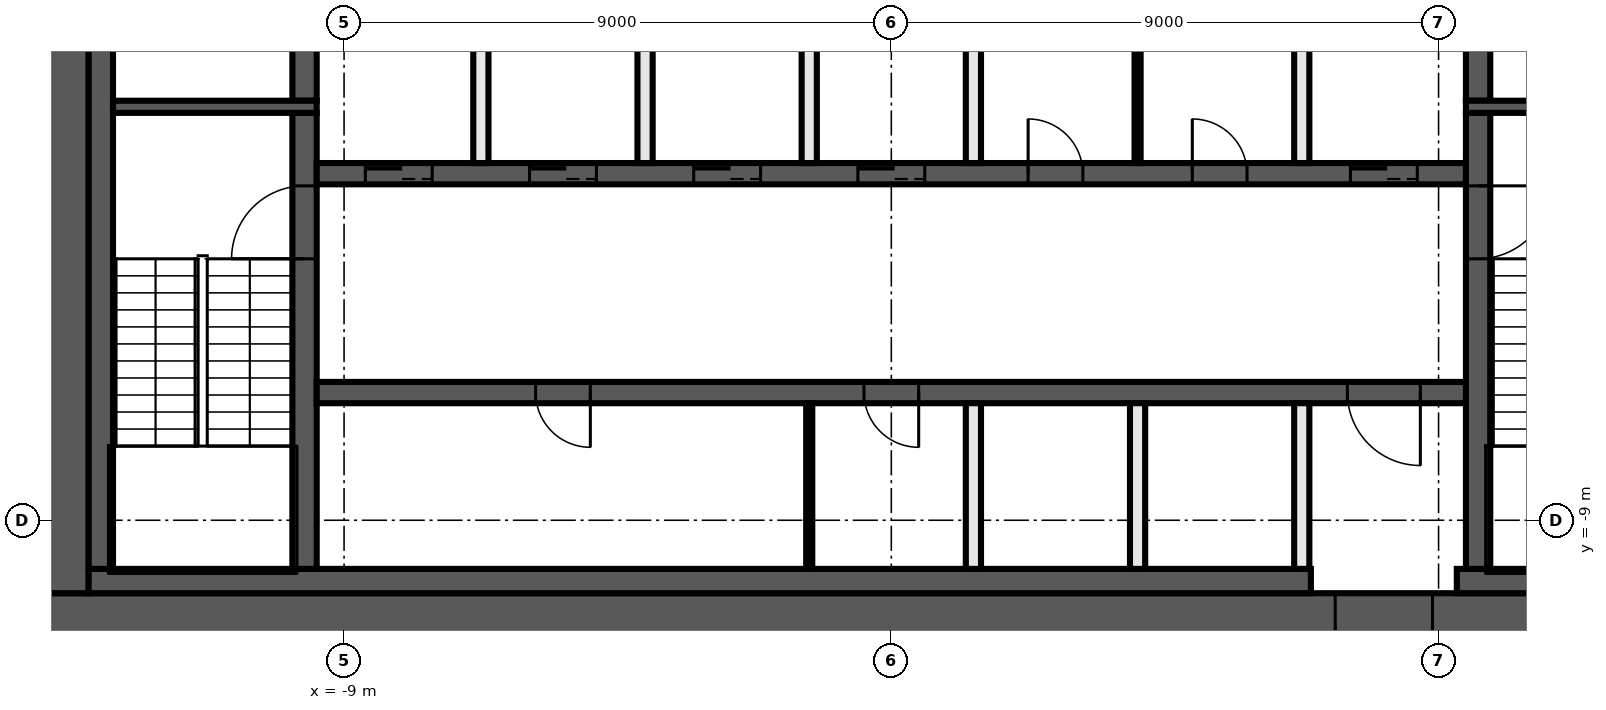
"""IFC4 building model, lengths in metres.
Left out: names, types, materials, properties, quantities, classifications, styles, units other than length and angle.
Written with IfcOpenShell. Run it as: python <this file> out.ifc"""

import sys

from ifc_helpers import new_model, si_unit, direction, frame, frame_2d, origin, place, context, subcontext, project, spatial, rectangle, extrude, element, fill, save


model = new_model("IFC4")
c1 = context("Model", 3, precision=1e-05, world=origin(), true_north=direction((0.0, 1.0)))
c2 = subcontext(c1, "Body", "Model", "MODEL_VIEW")
j1 = project(units=[si_unit("LENGTHUNIT", "METRE"), si_unit("PLANEANGLEUNIT", "RADIAN")], contexts=[c1])
p1 = place(None, origin())
s1 = spatial("IfcSite", under=j1, at=p1, CompositionType="ELEMENT")
p2 = place(p1, origin())
s2 = spatial("IfcBuilding", under=s1, at=p2, CompositionType="ELEMENT")
p3 = place(p2, frame((0.0, 0.0, 179.6)))
s3 = spatial("IfcBuildingStorey", under=s2, at=p3, CompositionType="ELEMENT", Elevation=179.6)
p4 = place(p3, frame((14.0, -10.6, 0.0), z_axis=(0.0, 0.0, 1.0), x_axis=(-1.0, 0.0, 0.0)))
e1 = element("IfcWall", 1, at=p4, inside=s3, PredefinedType="SHEAR", context=c2, shape_type="SweptSolid", body=[
    extrude(rectangle(XDim=28.0, YDim=0.8, at=frame_2d((14.0, 0.0))), origin(), (0.0, 0.0, 1.0), 3.7),
])
p5 = place(p4, frame((5.1, 0.0, 0.0)))
e2 = element("IfcOpeningElement", 2, at=p5, cuts=e1, PredefinedType="OPENING", context=c2, shape_type="SweptSolid", body=[
    extrude(rectangle(XDim=1.6, YDim=2.1, at=frame_2d((0.8, 1.05))), frame((0.0, 0.41, 0.0), z_axis=(0.0, -1.0, 0.0), x_axis=(1.0, 0.0, 0.0)), (0.0, 0.0, 1.0), 0.82),
])
p6 = place(p3, frame((-13.6, -10.2, 0.0), z_axis=(0.0, 0.0, 1.0), x_axis=(0.0, 1.0, 0.0)))
e3 = element("IfcWall", 3, at=p6, inside=s3, PredefinedType="SHEAR", context=c2, shape_type="SweptSolid", body=[
    extrude(rectangle(XDim=20.4, YDim=0.8, at=frame_2d((10.2, 0.0))), origin(), (0.0, 0.0, 1.0), 3.7),
])
p7 = place(p3, frame((13.2, -10.0, 0.0), z_axis=(0.0, 0.0, 1.0), x_axis=(-1.0, 0.0, 0.0)))
e4 = element("IfcWall", 4, at=p7, inside=s3, PredefinedType="SHEAR", context=c2, shape_type="SweptSolid", body=[
    extrude(rectangle(XDim=3.9, YDim=0.4, at=frame_2d((1.95, 0.0))), origin(), (0.0, 0.0, 1.0), 3.7),
])
p8 = place(p3, frame((6.9, -10.0, 0.0), z_axis=(0.0, 0.0, 1.0), x_axis=(-1.0, 0.0, 0.0)))
e5 = element("IfcWall", 5, at=p8, inside=s3, PredefinedType="SHEAR", context=c2, shape_type="SweptSolid", body=[
    extrude(rectangle(XDim=20.1, YDim=0.4, at=frame_2d((10.05, 0.0))), origin(), (0.0, 0.0, 1.0), 3.7),
])
p9 = place(p3, frame((-13.0, -9.8, 0.0), z_axis=(0.0, 0.0, 1.0), x_axis=(0.0, 1.0, 0.0)))
e6 = element("IfcWall", 6, at=p9, inside=s3, PredefinedType="SHEAR", context=c2, shape_type="SweptSolid", body=[
    extrude(rectangle(XDim=19.6, YDim=0.4, at=frame_2d((9.8, 0.0))), origin(), (0.0, 0.0, 1.0), 3.7),
])
p10 = place(p3, frame((9.65, -2.3, 0.0), z_axis=(0.0, 0.0, 1.0), x_axis=(0.0, -1.0, 0.0)))
e7 = element("IfcWall", 7, at=p10, inside=s3, PredefinedType="SHEAR", context=c2, shape_type="SweptSolid", body=[
    extrude(rectangle(XDim=7.5, YDim=0.4, at=frame_2d((3.75, 0.0))), origin(), (0.0, 0.0, 1.0), 3.7),
])
p11 = place(p10, frame((1.2, 0.0, 0.0)))
e8 = element("IfcOpeningElement", 8, at=p11, cuts=e7, PredefinedType="OPENING", context=c2, shape_type="SweptSolid", body=[
    extrude(rectangle(XDim=1.2, YDim=2.1, at=frame_2d((0.6, 1.05))), frame((0.0, 0.21, 0.0), z_axis=(0.0, -1.0, 0.0), x_axis=(1.0, 0.0, 0.0)), (0.0, 0.0, 1.0), 0.42),
])
p12 = place(p3, frame((9.65, 2.1, 0.0), z_axis=(0.0, 0.0, 1.0), x_axis=(0.0, -1.0, 0.0)))
e9 = element("IfcWall", 9, at=p12, inside=s3, PredefinedType="SHEAR", context=c2, shape_type="SweptSolid", body=[
    extrude(rectangle(XDim=4.2, YDim=0.4, at=frame_2d((2.1, 0.0))), origin(), (0.0, 0.0, 1.0), 3.7),
])
p13 = place(p12, frame((0.15, 0.0, 0.0)))
e10 = element("IfcOpeningElement", 10, at=p13, cuts=e9, PredefinedType="OPENING", context=c2, shape_type="SweptSolid", body=[
    extrude(rectangle(XDim=0.9, YDim=2.1, at=frame_2d((0.45, 1.05))), frame((0.0, 0.21, 0.0), z_axis=(0.0, -1.0, 0.0), x_axis=(1.0, 0.0, 0.0)), (0.0, 0.0, 1.0), 0.42),
])
p14 = place(p3, frame((-9.65, -9.8, 0.0), z_axis=(0.0, 0.0, 1.0), x_axis=(0.0, 1.0, 0.0)))
e11 = element("IfcWall", 11, at=p14, inside=s3, PredefinedType="SHEAR", context=c2, shape_type="SweptSolid", body=[
    extrude(rectangle(XDim=7.5, YDim=0.4, at=frame_2d((3.75, 0.0))), origin(), (0.0, 0.0, 1.0), 3.7),
])
p15 = place(p14, frame((5.1, 0.0, 0.0)))
e12 = element("IfcOpeningElement", 12, at=p15, cuts=e11, PredefinedType="OPENING", context=c2, shape_type="SweptSolid", body=[
    extrude(rectangle(XDim=1.2, YDim=2.1, at=frame_2d((0.6, 1.05))), frame((0.0, 0.21, 0.0), z_axis=(0.0, -1.0, 0.0), x_axis=(1.0, 0.0, 0.0)), (0.0, 0.0, 1.0), 0.42),
])
p16 = place(p3, frame((-9.65, -2.1, 0.0), z_axis=(0.0, 0.0, 1.0), x_axis=(0.0, 1.0, 0.0)))
e13 = element("IfcWall", 13, at=p16, inside=s3, PredefinedType="SHEAR", context=c2, shape_type="SweptSolid", body=[
    extrude(rectangle(XDim=4.2, YDim=0.4, at=frame_2d((2.1, 0.0))), origin(), (0.0, 0.0, 1.0), 3.7),
])
for number, where, z_axis, x_axis in (
    (14, (9.45, -2.2, 0.0), (0.0, 0.0, 1.0), (1.0, 0.0, 0.0)),
    (15, (-9.45, -2.2, 0.0), (0.0, 0.0, 1.0), (-1.0, 0.0, 0.0)),
):
    element("IfcWall", number, at=place(p3, frame(where, z_axis=z_axis, x_axis=x_axis)), inside=s3, PredefinedType="SHEAR", context=c2, shape_type="SweptSolid", body=[
        extrude(rectangle(XDim=3.35, YDim=0.2, at=frame_2d((1.675, 0.0))), origin(), (0.0, 0.0, 1.0), 3.7),
    ])
p17 = place(p3, frame((-9.45, -3.3, 0.0), z_axis=(0.0, 0.0, 1.0), x_axis=(1.0, 0.0, 0.0)))
e16 = element("IfcWall", 16, at=p17, inside=s3, PredefinedType="SHEAR", context=c2, shape_type="SweptSolid", body=[
    extrude(rectangle(XDim=18.9, YDim=0.35, at=frame_2d((9.45, 0.0))), origin(), (0.0, 0.0, 1.0), 3.7),
])
p18 = place(p17, frame((0.8, 0.0, 0.0)))
e17 = element("IfcOpeningElement", 17, at=p18, cuts=e16, PredefinedType="OPENING", context=c2, shape_type="SweptSolid", body=[
    extrude(rectangle(XDim=1.1, YDim=2.1, at=frame_2d((0.55, 1.05))), frame((0.0, 0.185, 0.0), z_axis=(0.0, -1.0, 0.0), x_axis=(1.0, 0.0, 0.0)), (0.0, 0.0, 1.0), 0.37),
])
p19 = place(p17, frame((3.5, 0.0, 0.0)))
e18 = element("IfcOpeningElement", 18, at=p19, cuts=e16, PredefinedType="OPENING", context=c2, shape_type="SweptSolid", body=[
    extrude(rectangle(XDim=1.1, YDim=2.1, at=frame_2d((0.55, 1.05))), frame((0.0, 0.185, 0.0), z_axis=(0.0, -1.0, 0.0), x_axis=(1.0, 0.0, 0.0)), (0.0, 0.0, 1.0), 0.37),
])
p20 = place(p17, frame((6.2, 0.0, 0.0)))
e19 = element("IfcOpeningElement", 19, at=p20, cuts=e16, PredefinedType="OPENING", context=c2, shape_type="SweptSolid", body=[
    extrude(rectangle(XDim=1.1, YDim=2.1, at=frame_2d((0.55, 1.05))), frame((0.0, 0.185, 0.0), z_axis=(0.0, -1.0, 0.0), x_axis=(1.0, 0.0, 0.0)), (0.0, 0.0, 1.0), 0.37),
])
p21 = place(p17, frame((8.9, 0.0, 0.0)))
e20 = element("IfcOpeningElement", 20, at=p21, cuts=e16, PredefinedType="OPENING", context=c2, shape_type="SweptSolid", body=[
    extrude(rectangle(XDim=1.1, YDim=2.1, at=frame_2d((0.55, 1.05))), frame((0.0, 0.185, 0.0), z_axis=(0.0, -1.0, 0.0), x_axis=(1.0, 0.0, 0.0)), (0.0, 0.0, 1.0), 0.37),
])
p22 = place(p17, frame((17.0, 0.0, 0.0)))
e21 = element("IfcOpeningElement", 21, at=p22, cuts=e16, PredefinedType="OPENING", context=c2, shape_type="SweptSolid", body=[
    extrude(rectangle(XDim=1.1, YDim=2.1, at=frame_2d((0.55, 1.05))), frame((0.0, 0.185, 0.0), z_axis=(0.0, -1.0, 0.0), x_axis=(1.0, 0.0, 0.0)), (0.0, 0.0, 1.0), 0.37),
])
p23 = place(p17, frame((11.7, 0.0, 0.0)))
e22 = element("IfcOpeningElement", 22, at=p23, cuts=e16, PredefinedType="OPENING", context=c2, shape_type="SweptSolid", body=[
    extrude(rectangle(XDim=0.9, YDim=2.1, at=frame_2d((0.45, 1.05))), frame((0.0, 0.185, 0.0), z_axis=(0.0, -1.0, 0.0), x_axis=(1.0, 0.0, 0.0)), (0.0, 0.0, 1.0), 0.37),
])
p24 = place(p17, frame((14.4, 0.0, 0.0)))
e23 = element("IfcOpeningElement", 23, at=p24, cuts=e16, PredefinedType="OPENING", context=c2, shape_type="SweptSolid", body=[
    extrude(rectangle(XDim=0.9, YDim=2.1, at=frame_2d((0.45, 1.05))), frame((0.0, 0.185, 0.0), z_axis=(0.0, -1.0, 0.0), x_axis=(1.0, 0.0, 0.0)), (0.0, 0.0, 1.0), 0.37),
])
p25 = place(p3, frame((9.45, -6.9, 0.0), z_axis=(0.0, 0.0, 1.0), x_axis=(-1.0, 0.0, 0.0)))
e24 = element("IfcWall", 24, at=p25, inside=s3, PredefinedType="SHEAR", context=c2, shape_type="SweptSolid", body=[
    extrude(rectangle(XDim=18.9, YDim=0.35, at=frame_2d((9.45, 0.0))), origin(), (0.0, 0.0, 1.0), 3.7),
])
p26 = place(p25, frame((0.75, 0.0, 0.0)))
e25 = element("IfcOpeningElement", 25, at=p26, cuts=e24, PredefinedType="OPENING", context=c2, shape_type="SweptSolid", body=[
    extrude(rectangle(XDim=1.2, YDim=2.1, at=frame_2d((0.6, 1.05))), frame((0.0, 0.185, 0.0), z_axis=(0.0, -1.0, 0.0), x_axis=(1.0, 0.0, 0.0)), (0.0, 0.0, 1.0), 0.37),
])
p27 = place(p25, frame((14.4, 0.0, 0.0)))
e26 = element("IfcOpeningElement", 26, at=p27, cuts=e24, PredefinedType="OPENING", context=c2, shape_type="SweptSolid", body=[
    extrude(rectangle(XDim=0.9, YDim=2.1, at=frame_2d((0.45, 1.05))), frame((0.0, 0.185, 0.0), z_axis=(0.0, -1.0, 0.0), x_axis=(1.0, 0.0, 0.0)), (0.0, 0.0, 1.0), 0.37),
])
p28 = place(p25, frame((9.0, 0.0, 0.0)))
e27 = element("IfcOpeningElement", 27, at=p28, cuts=e24, PredefinedType="OPENING", context=c2, shape_type="SweptSolid", body=[
    extrude(rectangle(XDim=0.9, YDim=2.1, at=frame_2d((0.45, 1.05))), frame((0.0, 0.185, 0.0), z_axis=(0.0, -1.0, 0.0), x_axis=(1.0, 0.0, 0.0)), (0.0, 0.0, 1.0), 0.37),
])
for number, where, z_axis, x_axis in (
    (28, (6.75, -9.8, 0.0), (0.0, 0.0, 1.0), (0.0, 1.0, 0.0)),
    (29, (6.75, -3.125, 0.0), (0.0, 0.0, 1.0), (0.0, 1.0, 0.0)),
):
    element("IfcWall", number, at=place(p3, frame(where, z_axis=z_axis, x_axis=x_axis)), inside=s3, PredefinedType="SOLIDWALL", context=c2, shape_type="SweptSolid", body=[
        extrude(rectangle(XDim=2.725, YDim=0.25, at=frame_2d((1.363, 0.0))), origin(), (0.0, 0.0, 1.0), 3.7),
    ])
p29 = place(p3, frame((4.05, -3.125, 0.0), z_axis=(0.0, 0.0, 1.0), x_axis=(0.0, 1.0, 0.0)))
e30 = element("IfcWall", 30, at=p29, inside=s3, PredefinedType="PARTITIONING", context=c2, shape_type="SweptSolid", body=[
    extrude(rectangle(XDim=2.725, YDim=0.1, at=frame_2d((1.363, 0.0))), origin(), (0.0, 0.0, 1.0), 3.7),
])
for number, where, z_axis, x_axis in (
    (31, (4.05, -9.8, 0.0), (0.0, 0.0, 1.0), (0.0, 1.0, 0.0)),
    (32, (1.35, -9.8, 0.0), (0.0, 0.0, 1.0), (0.0, 1.0, 0.0)),
    (33, (1.35, -3.125, 0.0), (0.0, 0.0, 1.0), (0.0, 1.0, 0.0)),
):
    element("IfcWall", number, at=place(p3, frame(where, z_axis=z_axis, x_axis=x_axis)), inside=s3, PredefinedType="SOLIDWALL", context=c2, shape_type="SweptSolid", body=[
        extrude(rectangle(XDim=2.725, YDim=0.25, at=frame_2d((1.363, 0.0))), origin(), (0.0, 0.0, 1.0), 3.7),
    ])
p30 = place(p3, frame((-1.35, -9.8, 0.0), z_axis=(0.0, 0.0, 1.0), x_axis=(0.0, 1.0, 0.0)))
e34 = element("IfcWall", 34, at=p30, inside=s3, PredefinedType="PARTITIONING", context=c2, shape_type="SweptSolid", body=[
    extrude(rectangle(XDim=2.725, YDim=0.1, at=frame_2d((1.363, 0.0))), origin(), (0.0, 0.0, 1.0), 3.7),
])
for number, where, z_axis, x_axis in (
    (35, (-1.35, -3.125, 0.0), (0.0, 0.0, 1.0), (0.0, 1.0, 0.0)),
    (36, (-4.05, -3.125, 0.0), (0.0, 0.0, 1.0), (0.0, 1.0, 0.0)),
    (37, (-6.75, -3.125, 0.0), (0.0, 0.0, 1.0), (0.0, 1.0, 0.0)),
):
    element("IfcWall", number, at=place(p3, frame(where, z_axis=z_axis, x_axis=x_axis)), inside=s3, PredefinedType="SOLIDWALL", context=c2, shape_type="SweptSolid", body=[
        extrude(rectangle(XDim=2.725, YDim=0.25, at=frame_2d((1.363, 0.0))), origin(), (0.0, 0.0, 1.0), 3.7),
    ])
p31 = place(p18, origin())
e38 = element("IfcDoor", 38, at=p31, inside=s3, OperationType="DOUBLE_DOOR_SLIDING", PredefinedType="DOOR", context=c2, shape_type="SweptSolid", body=[
    extrude(rectangle(XDim=1.1, YDim=2.1, at=frame_2d((0.55, 1.05))), frame((0.0, 0.025, 0.0), z_axis=(0.0, -1.0, 0.0), x_axis=(1.0, 0.0, 0.0)), (0.0, 0.0, 1.0), 0.05),
])
fill(e17, e38)
p32 = place(p19, origin())
e39 = element("IfcDoor", 39, at=p32, inside=s3, OperationType="DOUBLE_DOOR_SLIDING", PredefinedType="DOOR", context=c2, shape_type="SweptSolid", body=[
    extrude(rectangle(XDim=1.1, YDim=2.1, at=frame_2d((0.55, 1.05))), frame((0.0, 0.025, 0.0), z_axis=(0.0, -1.0, 0.0), x_axis=(1.0, 0.0, 0.0)), (0.0, 0.0, 1.0), 0.05),
])
fill(e18, e39)
p33 = place(p20, origin())
e40 = element("IfcDoor", 40, at=p33, inside=s3, OperationType="DOUBLE_DOOR_SLIDING", PredefinedType="DOOR", context=c2, shape_type="SweptSolid", body=[
    extrude(rectangle(XDim=1.1, YDim=2.1, at=frame_2d((0.55, 1.05))), frame((0.0, 0.025, 0.0), z_axis=(0.0, -1.0, 0.0), x_axis=(1.0, 0.0, 0.0)), (0.0, 0.0, 1.0), 0.05),
])
fill(e19, e40)
p34 = place(p21, origin())
e41 = element("IfcDoor", 41, at=p34, inside=s3, OperationType="DOUBLE_DOOR_SLIDING", PredefinedType="DOOR", context=c2, shape_type="SweptSolid", body=[
    extrude(rectangle(XDim=1.1, YDim=2.1, at=frame_2d((0.55, 1.05))), frame((0.0, 0.025, 0.0), z_axis=(0.0, -1.0, 0.0), x_axis=(1.0, 0.0, 0.0)), (0.0, 0.0, 1.0), 0.05),
])
fill(e20, e41)
p35 = place(p22, origin())
e42 = element("IfcDoor", 42, at=p35, inside=s3, OperationType="DOUBLE_DOOR_SLIDING", PredefinedType="DOOR", context=c2, shape_type="SweptSolid", body=[
    extrude(rectangle(XDim=1.1, YDim=2.1, at=frame_2d((0.55, 1.05))), frame((0.0, 0.025, 0.0), z_axis=(0.0, -1.0, 0.0), x_axis=(1.0, 0.0, 0.0)), (0.0, 0.0, 1.0), 0.05),
])
fill(e21, e42)
p36 = place(p5, origin())
e43 = element("IfcDoor", 43, at=p36, inside=s3, OperationType="DOUBLE_DOOR_SINGLE_SWING", PredefinedType="DOOR", context=c2, shape_type="SweptSolid", body=[
    extrude(rectangle(XDim=1.6, YDim=2.1, at=frame_2d((0.8, 1.05))), frame((0.0, 0.025, 0.0), z_axis=(0.0, -1.0, 0.0), x_axis=(1.0, 0.0, 0.0)), (0.0, 0.0, 1.0), 0.05),
])
fill(e2, e43)
p37 = place(p26, origin())
e44 = element("IfcDoor", 44, at=p37, inside=s3, OperationType="SINGLE_SWING_LEFT", PredefinedType="DOOR", context=c2, shape_type="SweptSolid", body=[
    extrude(rectangle(XDim=1.2, YDim=2.1, at=frame_2d((0.6, 1.05))), frame((0.0, 0.025, 0.0), z_axis=(0.0, -1.0, 0.0), x_axis=(1.0, 0.0, 0.0)), (0.0, 0.0, 1.0), 0.05),
])
fill(e25, e44)
p38 = place(p23, origin())
e45 = element("IfcDoor", 45, at=p38, inside=s3, OperationType="SINGLE_SWING_RIGHT", PredefinedType="DOOR", context=c2, shape_type="SweptSolid", body=[
    extrude(rectangle(XDim=0.9, YDim=2.1, at=frame_2d((0.45, 1.05))), frame((0.0, 0.025, 0.0), z_axis=(0.0, -1.0, 0.0), x_axis=(1.0, 0.0, 0.0)), (0.0, 0.0, 1.0), 0.05),
])
fill(e22, e45)
p39 = place(p24, origin())
e46 = element("IfcDoor", 46, at=p39, inside=s3, OperationType="SINGLE_SWING_LEFT", PredefinedType="DOOR", context=c2, shape_type="SweptSolid", body=[
    extrude(rectangle(XDim=0.9, YDim=2.1, at=frame_2d((0.45, 1.05))), frame((0.0, 0.025, 0.0), z_axis=(0.0, -1.0, 0.0), x_axis=(1.0, 0.0, 0.0)), (0.0, 0.0, 1.0), 0.05),
])
fill(e23, e46)
p40 = place(p27, origin())
e47 = element("IfcDoor", 47, at=p40, inside=s3, OperationType="SINGLE_SWING_RIGHT", PredefinedType="DOOR", context=c2, shape_type="SweptSolid", body=[
    extrude(rectangle(XDim=0.9, YDim=2.1, at=frame_2d((0.45, 1.05))), frame((0.0, 0.025, 0.0), z_axis=(0.0, -1.0, 0.0), x_axis=(1.0, 0.0, 0.0)), (0.0, 0.0, 1.0), 0.05),
])
fill(e26, e47)
p41 = place(p28, origin())
e48 = element("IfcDoor", 48, at=p41, inside=s3, OperationType="SINGLE_SWING_LEFT", PredefinedType="DOOR", context=c2, shape_type="SweptSolid", body=[
    extrude(rectangle(XDim=0.9, YDim=2.1, at=frame_2d((0.45, 1.05))), frame((0.0, 0.025, 0.0), z_axis=(0.0, -1.0, 0.0), x_axis=(1.0, 0.0, 0.0)), (0.0, 0.0, 1.0), 0.05),
])
fill(e27, e48)
p42 = place(p11, origin())
e49 = element("IfcDoor", 49, at=p42, inside=s3, OperationType="SINGLE_SWING_RIGHT", PredefinedType="DOOR", context=c2, shape_type="SweptSolid", body=[
    extrude(rectangle(XDim=1.2, YDim=2.1, at=frame_2d((0.6, 1.05))), frame((0.0, 0.025, 0.0), z_axis=(0.0, -1.0, 0.0), x_axis=(1.0, 0.0, 0.0)), (0.0, 0.0, 1.0), 0.05),
])
fill(e8, e49)
p43 = place(p15, origin())
e50 = element("IfcDoor", 50, at=p43, inside=s3, OperationType="SINGLE_SWING_LEFT", PredefinedType="DOOR", context=c2, shape_type="SweptSolid", body=[
    extrude(rectangle(XDim=1.2, YDim=2.1, at=frame_2d((0.6, 1.05))), frame((0.0, 0.025, 0.0), z_axis=(0.0, -1.0, 0.0), x_axis=(1.0, 0.0, 0.0)), (0.0, 0.0, 1.0), 0.05),
])
fill(e12, e50)
save(model, sys.argv[1])
